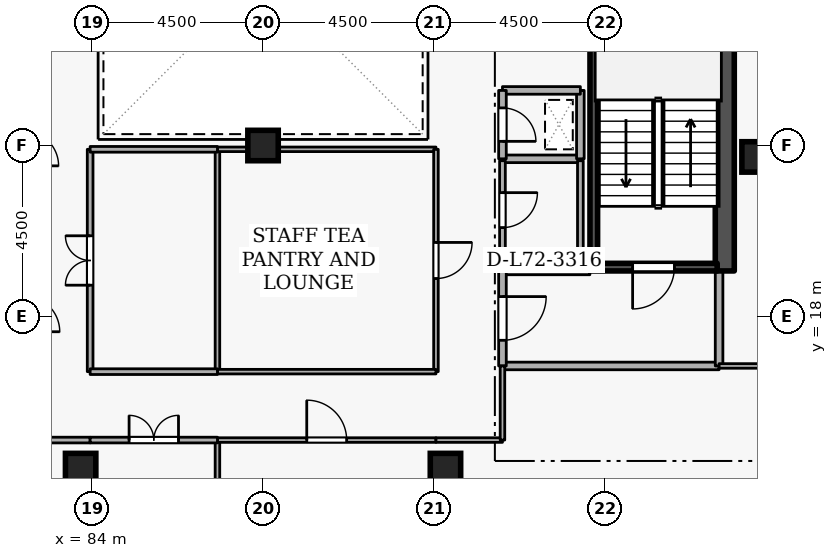
"""IFC4 building model, lengths in metres.
Left out: names, types, materials, properties, quantities, classifications, styles, units other than length and angle.
Written with IfcOpenShell. Run it as: python <this file> out.ifc"""

import sys

from ifc_helpers import new_model, si_unit, direction, frame, frame_2d, origin, origin_2d, place, context, subcontext, project, spatial, rectangle, extrude, element, fill, save


model = new_model("IFC4")
c1 = context("Model", 3, precision=1e-05, world=origin(), true_north=direction((0.0, 1.0)))
c2 = subcontext(c1, "Body", "Model", "MODEL_VIEW")
j1 = project(units=[si_unit("LENGTHUNIT", "METRE"), si_unit("PLANEANGLEUNIT", "RADIAN")], contexts=[c1])
p1 = place(None, origin())
s1 = spatial("IfcSite", under=j1, at=p1, CompositionType="ELEMENT")
p2 = place(p1, origin())
s2 = spatial("IfcBuilding", under=s1, at=p2, CompositionType="ELEMENT")
p3 = place(p2, frame((0.0, 0.0, 269.1)))
s3 = spatial("IfcBuildingStorey", under=s2, at=p3, CompositionType="ELEMENT", Elevation=269.1)
p4 = place(p3, frame((100.65, 19.2, 0.0), z_axis=(0.0, 0.0, 1.0), x_axis=(0.0, 1.0, 0.0)))
e1 = element("IfcWall", 1, at=p4, inside=s3, PredefinedType="SHEAR", context=c2, shape_type="SweptSolid", body=[
    extrude(rectangle(XDim=15.6, YDim=0.5, at=frame_2d((7.8, 0.0))), origin(), (0.0, 0.0, 1.0), 3.6),
])
for number, where, z_axis, x_axis in (
    (2, (93.3, 14.0, 0.0), (0.0, 0.0, 1.0), (1.0, 0.0, 0.0)),
    (3, (83.7, 14.0, 0.0), (0.0, 0.0, 1.0), (1.0, 0.0, 0.0)),
    (4, (101.5, 22.2, 0.0), (0.0, 0.0, 1.0), (1.0, 0.0, 0.0)),
    (5, (88.5, 22.5, 0.0), (0.0, 0.0, 1.0), (1.0, 0.0, 0.0)),
):
    element("IfcColumn", number, at=place(p3, frame(where, z_axis=z_axis, x_axis=x_axis)), inside=s3, PredefinedType="COLUMN", context=c2, shape_type="SweptSolid", body=[
        extrude(rectangle(XDim=0.8, YDim=0.8, at=origin_2d()), origin(), (0.0, 0.0, 1.0), 3.6),
    ])
p5 = place(p3, frame((100.45, 19.3, 0.0), z_axis=(0.0, 0.0, 1.0), x_axis=(-1.0, 0.0, 0.0)))
e6 = element("IfcWall", 6, at=p5, inside=s3, PredefinedType="SHEAR", context=c2, shape_type="SweptSolid", body=[
    extrude(rectangle(XDim=3.35, YDim=0.2, at=frame_2d((1.675, 0.0))), origin(), (0.0, 0.0, 1.0), 3.6),
])
p6 = place(p5, frame((1.125, 0.0, 0.0)))
e7 = element("IfcOpeningElement", 7, at=p6, cuts=e6, PredefinedType="OPENING", context=c2, shape_type="SweptSolid", body=[
    extrude(rectangle(XDim=1.1, YDim=2.1, at=frame_2d((0.55, 1.05))), frame((0.0, 0.11, 0.0), z_axis=(0.0, -1.0, 0.0), x_axis=(1.0, 0.0, 0.0)), (0.0, 0.0, 1.0), 0.22),
])
p7 = place(p3, frame((97.203, 26.55, 0.0), z_axis=(0.0, 0.0, 1.0), x_axis=(0.0, -1.0, 0.0)))
e8 = element("IfcWall", 8, at=p7, inside=s3, PredefinedType="SHEAR", context=c2, shape_type="SweptSolid", body=[
    extrude(rectangle(XDim=7.1, YDim=0.2, at=frame_2d((3.55, 0.0))), origin(), (0.0, 0.0, 1.0), 3.6),
])
p8 = place(p3, frame((94.8, 16.7, 0.0), z_axis=(0.0, 0.0, 1.0), x_axis=(1.0, 0.0, 0.0)))
e9 = element("IfcWall", 9, at=p8, inside=s3, PredefinedType="STANDARD", context=c2, shape_type="SweptSolid", body=[
    extrude(rectangle(XDim=5.7, YDim=0.2, at=frame_2d((2.85, 0.0))), origin(), (0.0, 0.0, 1.0), 3.34),
])
p9 = place(p3, frame((100.5, 16.7, 0.0), z_axis=(0.0, 0.0, 1.0), x_axis=(0.0, 1.0, 0.0)))
e10 = element("IfcWall", 10, at=p9, inside=s3, PredefinedType="STANDARD", context=c2, shape_type="SweptSolid", body=[
    extrude(rectangle(XDim=2.5, YDim=0.2, at=frame_2d((1.25, 0.0))), origin(), (0.0, 0.0, 1.0), 3.34),
])
p10 = place(p3, frame((97.1, 19.2, 0.0), z_axis=(0.0, 0.0, 1.0), x_axis=(-1.0, 0.0, 0.0)))
e11 = element("IfcWall", 11, at=p10, inside=s3, PredefinedType="STANDARD", context=c2, shape_type="SweptSolid", body=[
    extrude(rectangle(XDim=2.3, YDim=0.2, at=frame_2d((1.15, 0.0))), origin(), (0.0, 0.0, 1.0), 2.545),
])
p11 = place(p3, frame((94.8, 19.2, 0.0), z_axis=(0.0, 0.0, 1.0), x_axis=(0.0, -1.0, 0.0)))
e12 = element("IfcWall", 12, at=p11, inside=s3, PredefinedType="STANDARD", context=c2, shape_type="SweptSolid", body=[
    extrude(rectangle(XDim=2.5, YDim=0.2, at=frame_2d((1.25, 0.0))), origin(), (0.0, 0.0, 1.0), 3.34),
])
p12 = place(p11, frame((0.675, 0.0, 0.0)))
e13 = element("IfcOpeningElement", 13, at=p12, cuts=e12, PredefinedType="OPENING", context=c2, shape_type="SweptSolid", body=[
    extrude(rectangle(XDim=1.15, YDim=2.1, at=frame_2d((0.575, 1.05))), frame((0.0, 0.11, 0.0), z_axis=(0.0, -1.0, 0.0), x_axis=(1.0, 0.0, 0.0)), (0.0, 0.0, 1.0), 0.22),
])
p13 = place(p3, frame((94.8, 22.15, 0.0), z_axis=(0.0, 0.0, 1.0), x_axis=(1.0, 0.0, 0.0)))
e14 = element("IfcWall", 14, at=p13, inside=s3, PredefinedType="STANDARD", context=c2, shape_type="SweptSolid", body=[
    extrude(rectangle(XDim=2.05, YDim=0.2, at=frame_2d((1.025, 0.0))), origin(), (0.0, 0.0, 1.0), 3.34),
])
p14 = place(p3, frame((96.85, 22.15, 0.0), z_axis=(0.0, 0.0, 1.0), x_axis=(0.0, 1.0, 0.0)))
e15 = element("IfcWall", 15, at=p14, inside=s3, PredefinedType="STANDARD", context=c2, shape_type="SweptSolid", body=[
    extrude(rectangle(XDim=1.8, YDim=0.2, at=frame_2d((0.9, 0.0))), origin(), (0.0, 0.0, 1.0), 3.34),
])
p15 = place(p3, frame((96.85, 23.95, 0.0), z_axis=(0.0, 0.0, 1.0), x_axis=(-1.0, 0.0, 0.0)))
e16 = element("IfcWall", 16, at=p15, inside=s3, PredefinedType="STANDARD", context=c2, shape_type="SweptSolid", body=[
    extrude(rectangle(XDim=2.05, YDim=0.2, at=frame_2d((1.025, 0.0))), origin(), (0.0, 0.0, 1.0), 3.34),
])
p16 = place(p3, frame((94.8, 23.95, 0.0), z_axis=(0.0, 0.0, 1.0), x_axis=(0.0, -1.0, 0.0)))
e17 = element("IfcWall", 17, at=p16, inside=s3, PredefinedType="STANDARD", context=c2, shape_type="SweptSolid", body=[
    extrude(rectangle(XDim=1.8, YDim=0.2, at=frame_2d((0.9, 0.0))), origin(), (0.0, 0.0, 1.0), 3.34),
])
p17 = place(p16, frame((0.46, 0.0, 0.0)))
e18 = element("IfcOpeningElement", 18, at=p17, cuts=e17, PredefinedType="OPENING", context=c2, shape_type="SweptSolid", body=[
    extrude(rectangle(XDim=0.88, YDim=2.04, at=frame_2d((0.44, 1.02))), frame((0.0, 0.11, 0.0), z_axis=(0.0, -1.0, 0.0), x_axis=(1.0, 0.0, 0.0)), (0.0, 0.0, 1.0), 0.22),
])
p18 = place(p3, frame((94.8, 19.5, 0.0), z_axis=(0.0, 0.0, 1.0), x_axis=(1.0, 0.0, 0.0)))
e19 = element("IfcWall", 19, at=p18, inside=s3, PredefinedType="PARTITIONING", context=c2, shape_type="SweptSolid", body=[
    extrude(rectangle(XDim=2.05, YDim=0.15, at=frame_2d((1.025, 0.0))), origin(), (0.0, 0.0, 1.0), 2.545),
])
p19 = place(p3, frame((96.85, 19.5, 0.0), z_axis=(0.0, 0.0, 1.0), x_axis=(0.0, 1.0, 0.0)))
e20 = element("IfcWall", 20, at=p19, inside=s3, PredefinedType="PARTITIONING", context=c2, shape_type="SweptSolid", body=[
    extrude(rectangle(XDim=2.6, YDim=0.15, at=frame_2d((1.3, 0.0))), origin(), (0.0, 0.0, 1.0), 3.34),
])
p20 = place(p3, frame((94.8, 22.1, 0.0), z_axis=(0.0, 0.0, 1.0), x_axis=(0.0, -1.0, 0.0)))
e21 = element("IfcWall", 21, at=p20, inside=s3, PredefinedType="PARTITIONING", context=c2, shape_type="SweptSolid", body=[
    extrude(rectangle(XDim=2.6, YDim=0.15, at=frame_2d((1.3, 0.0))), origin(), (0.0, 0.0, 1.0), 3.34),
])
p21 = place(p20, frame((0.84, 0.0, 0.0)))
e22 = element("IfcOpeningElement", 22, at=p21, cuts=e21, PredefinedType="OPENING", context=c2, shape_type="SweptSolid", body=[
    extrude(rectangle(XDim=0.92, YDim=2.08, at=frame_2d((0.46, 1.04))), frame((0.0, 0.085, 0.0), z_axis=(0.0, -1.0, 0.0), x_axis=(1.0, 0.0, 0.0)), (0.0, 0.0, 1.0), 0.17),
])
p22 = place(p3, frame((87.3, 9.28, 0.0), z_axis=(0.0, 0.0, 1.0), x_axis=(0.0, 1.0, 0.0)))
e23 = element("IfcWall", 23, at=p22, inside=s3, PredefinedType="PARTITIONING", context=c2, shape_type="SweptSolid", body=[
    extrude(rectangle(XDim=5.47, YDim=0.12, at=frame_2d((2.735, 0.0))), origin(), (0.0, 0.0, 1.0), 3.34),
])
p23 = place(p3, frame((87.3, 14.75, 0.0), z_axis=(0.0, 0.0, 1.0), x_axis=(1.0, 0.0, 0.0)))
e24 = element("IfcWall", 24, at=p23, inside=s3, PredefinedType="PARTITIONING", context=c2, shape_type="SweptSolid", body=[
    extrude(rectangle(XDim=5.75, YDim=0.12, at=frame_2d((2.875, 0.0))), origin(), (0.0, 0.0, 1.0), 3.34),
])
p24 = place(p23, frame((2.35, 0.0, 0.0)))
e25 = element("IfcOpeningElement", 25, at=p24, cuts=e24, PredefinedType="OPENING", context=c2, shape_type="SweptSolid", body=[
    extrude(rectangle(XDim=1.05, YDim=2.1, at=frame_2d((0.525, 1.05))), frame((0.0, 0.07, 0.0), z_axis=(0.0, -1.0, 0.0), x_axis=(1.0, 0.0, 0.0)), (0.0, 0.0, 1.0), 0.14),
])
p25 = place(p3, frame((93.05, 14.75, 0.0), z_axis=(0.0, 0.0, 1.0), x_axis=(1.0, 0.0, 0.0)))
e26 = element("IfcWall", 26, at=p25, inside=s3, PredefinedType="PARTITIONING", context=c2, shape_type="SweptSolid", body=[
    extrude(rectangle(XDim=1.75, YDim=0.12, at=frame_2d((0.875, 0.0))), origin(), (0.0, 0.0, 1.0), 3.34),
])
p26 = place(p3, frame((94.8, 14.75, 0.0), z_axis=(0.0, 0.0, 1.0), x_axis=(0.0, 1.0, 0.0)))
e27 = element("IfcWall", 27, at=p26, inside=s3, PredefinedType="PARTITIONING", context=c2, shape_type="SweptSolid", body=[
    extrude(rectangle(XDim=1.95, YDim=0.12, at=frame_2d((0.975, 0.0))), origin(), (0.0, 0.0, 1.0), 3.34),
])
p27 = place(p3, frame((100.5, 16.7, 0.0), z_axis=(0.0, 0.0, 1.0), x_axis=(1.0, 0.0, 0.0)))
e28 = element("IfcWall", 28, at=p27, inside=s3, PredefinedType="PARTITIONING", context=c2, shape_type="SweptSolid", body=[
    extrude(rectangle(XDim=11.72, YDim=0.12, at=frame_2d((5.86, 0.0))), origin(), (0.0, 0.0, 1.0), 3.34),
])
p28 = place(p3, frame((82.2, 14.75, 0.0), z_axis=(0.0, 0.0, 1.0), x_axis=(1.0, 0.0, 0.0)))
e29 = element("IfcWall", 29, at=p28, inside=s3, PredefinedType="PARTITIONING", context=c2, shape_type="SweptSolid", body=[
    extrude(rectangle(XDim=1.75, YDim=0.15, at=frame_2d((0.875, 0.0))), origin(), (0.0, 0.0, 1.0), 3.34),
])
p29 = place(p3, frame((83.95, 14.75, 0.0), z_axis=(0.0, 0.0, 1.0), x_axis=(1.0, 0.0, 0.0)))
e30 = element("IfcWall", 30, at=p29, inside=s3, PredefinedType="PARTITIONING", context=c2, shape_type="SweptSolid", body=[
    extrude(rectangle(XDim=3.35, YDim=0.15, at=frame_2d((1.675, 0.0))), origin(), (0.0, 0.0, 1.0), 3.34),
])
p30 = place(p29, frame((1.025, 0.0, 0.0)))
e31 = element("IfcOpeningElement", 31, at=p30, cuts=e30, PredefinedType="OPENING", context=c2, shape_type="SweptSolid", body=[
    extrude(rectangle(XDim=1.3, YDim=2.12, at=frame_2d((0.65, 1.06))), frame((0.0, 0.085, 0.0), z_axis=(0.0, -1.0, 0.0), x_axis=(1.0, 0.0, 0.0)), (0.0, 0.0, 1.0), 0.17),
])
p31 = place(p3, frame((87.3, 16.55, 0.0), z_axis=(0.0, 0.0, 1.0), x_axis=(0.0, 1.0, 0.0)))
e32 = element("IfcWall", 32, at=p31, inside=s3, PredefinedType="PARTITIONING", context=c2, shape_type="SweptSolid", body=[
    extrude(rectangle(XDim=5.85, YDim=0.12, at=frame_2d((2.925, 0.0))), origin(), (0.0, 0.0, 1.0), 3.34),
])
p32 = place(p3, frame((87.3, 22.4, 0.0), z_axis=(0.0, 0.0, 1.0), x_axis=(1.0, 0.0, 0.0)))
e33 = element("IfcWall", 33, at=p32, inside=s3, PredefinedType="PARTITIONING", context=c2, shape_type="SweptSolid", body=[
    extrude(rectangle(XDim=5.75, YDim=0.12, at=frame_2d((2.875, 0.0))), origin(), (0.0, 0.0, 1.0), 3.34),
])
p33 = place(p3, frame((93.05, 22.4, 0.0), z_axis=(0.0, 0.0, 1.0), x_axis=(0.0, -1.0, 0.0)))
e34 = element("IfcWall", 34, at=p33, inside=s3, PredefinedType="PARTITIONING", context=c2, shape_type="SweptSolid", body=[
    extrude(rectangle(XDim=5.85, YDim=0.12, at=frame_2d((2.925, 0.0))), origin(), (0.0, 0.0, 1.0), 3.34),
])
p34 = place(p33, frame((2.45, 0.0, 0.0)))
e35 = element("IfcOpeningElement", 35, at=p34, cuts=e34, PredefinedType="OPENING", context=c2, shape_type="SweptSolid", body=[
    extrude(rectangle(XDim=0.95, YDim=2.1, at=frame_2d((0.475, 1.05))), frame((0.0, 0.07, 0.0), z_axis=(0.0, -1.0, 0.0), x_axis=(1.0, 0.0, 0.0)), (0.0, 0.0, 1.0), 0.14),
])
p35 = place(p3, frame((93.05, 16.55, 0.0), z_axis=(0.0, 0.0, 1.0), x_axis=(-1.0, 0.0, 0.0)))
e36 = element("IfcWall", 36, at=p35, inside=s3, PredefinedType="PARTITIONING", context=c2, shape_type="SweptSolid", body=[
    extrude(rectangle(XDim=5.75, YDim=0.12, at=frame_2d((2.875, 0.0))), origin(), (0.0, 0.0, 1.0), 3.34),
])
p36 = place(p3, frame((83.95, 16.55, 0.0), z_axis=(0.0, 0.0, 1.0), x_axis=(0.0, 1.0, 0.0)))
e37 = element("IfcWall", 37, at=p36, inside=s3, PredefinedType="PARTITIONING", context=c2, shape_type="SweptSolid", body=[
    extrude(rectangle(XDim=5.85, YDim=0.15, at=frame_2d((2.925, 0.0))), origin(), (0.0, 0.0, 1.0), 3.34),
])
p37 = place(p36, frame((2.275, 0.0, 0.0)))
e38 = element("IfcOpeningElement", 38, at=p37, cuts=e37, PredefinedType="OPENING", context=c2, shape_type="SweptSolid", body=[
    extrude(rectangle(XDim=1.3, YDim=2.12, at=frame_2d((0.65, 1.06))), frame((0.0, 0.085, 0.0), z_axis=(0.0, -1.0, 0.0), x_axis=(1.0, 0.0, 0.0)), (0.0, 0.0, 1.0), 0.17),
])
for number, where, z_axis, x_axis in (
    (39, (83.95, 22.4, 0.0), (0.0, 0.0, 1.0), (1.0, 0.0, 0.0)),
    (40, (87.3, 16.55, 0.0), (0.0, 0.0, 1.0), (-1.0, 0.0, 0.0)),
):
    element("IfcWall", number, at=place(p3, frame(where, z_axis=z_axis, x_axis=x_axis)), inside=s3, PredefinedType="PARTITIONING", context=c2, shape_type="SweptSolid", body=[
        extrude(rectangle(XDim=3.35, YDim=0.15, at=frame_2d((1.675, 0.0))), origin(), (0.0, 0.0, 1.0), 3.34),
    ])
p38 = place(p6, origin())
e41 = element("IfcDoor", 41, at=p38, inside=s3, OperationType="SINGLE_SWING_RIGHT", PredefinedType="DOOR", context=c2, shape_type="SweptSolid", body=[
    extrude(rectangle(XDim=1.1, YDim=2.1, at=frame_2d((0.55, 1.05))), frame((0.0, 0.025, 0.0), z_axis=(0.0, -1.0, 0.0), x_axis=(1.0, 0.0, 0.0)), (0.0, 0.0, 1.0), 0.05),
])
fill(e7, e41)
p39 = place(p12, origin())
e42 = element("IfcDoor", 42, at=p39, inside=s3, OperationType="SINGLE_SWING_LEFT", PredefinedType="DOOR", context=c2, shape_type="SweptSolid", body=[
    extrude(rectangle(XDim=1.15, YDim=2.1, at=frame_2d((0.575, 1.05))), frame((0.0, 0.025, 0.0), z_axis=(0.0, -1.0, 0.0), x_axis=(1.0, 0.0, 0.0)), (0.0, 0.0, 1.0), 0.05),
])
fill(e13, e42)
p40 = place(p17, origin())
e43 = element("IfcDoor", 43, at=p40, inside=s3, OperationType="SINGLE_SWING_RIGHT", PredefinedType="DOOR", context=c2, shape_type="SweptSolid", body=[
    extrude(rectangle(XDim=0.88, YDim=2.04, at=frame_2d((0.44, 1.02))), frame((0.0, 0.025, 0.0), z_axis=(0.0, -1.0, 0.0), x_axis=(1.0, 0.0, 0.0)), (0.0, 0.0, 1.0), 0.05),
])
fill(e18, e43)
p41 = place(p21, origin())
e44 = element("IfcDoor", 44, at=p41, inside=s3, OperationType="SINGLE_SWING_LEFT", PredefinedType="DOOR", context=c2, shape_type="SweptSolid", body=[
    extrude(rectangle(XDim=0.92, YDim=2.08, at=frame_2d((0.46, 1.04))), frame((0.0, 0.025, 0.0), z_axis=(0.0, -1.0, 0.0), x_axis=(1.0, 0.0, 0.0)), (0.0, 0.0, 1.0), 0.05),
])
fill(e22, e44)
p42 = place(p24, origin())
e45 = element("IfcDoor", 45, at=p42, inside=s3, OperationType="SINGLE_SWING_LEFT", PredefinedType="DOOR", context=c2, shape_type="SweptSolid", body=[
    extrude(rectangle(XDim=1.05, YDim=2.1, at=frame_2d((0.525, 1.05))), frame((0.0, 0.025, 0.0), z_axis=(0.0, -1.0, 0.0), x_axis=(1.0, 0.0, 0.0)), (0.0, 0.0, 1.0), 0.05),
])
fill(e25, e45)
p43 = place(p30, origin())
e46 = element("IfcDoor", 46, at=p43, inside=s3, OperationType="DOUBLE_DOOR_SINGLE_SWING", PredefinedType="DOOR", context=c2, shape_type="SweptSolid", body=[
    extrude(rectangle(XDim=1.3, YDim=2.12, at=frame_2d((0.65, 1.06))), frame((0.0, 0.025, 0.0), z_axis=(0.0, -1.0, 0.0), x_axis=(1.0, 0.0, 0.0)), (0.0, 0.0, 1.0), 0.05),
])
fill(e31, e46)
p44 = place(p34, origin())
e47 = element("IfcDoor", 47, at=p44, inside=s3, OperationType="SINGLE_SWING_LEFT", PredefinedType="DOOR", context=c2, shape_type="SweptSolid", body=[
    extrude(rectangle(XDim=0.95, YDim=2.1, at=frame_2d((0.475, 1.05))), frame((0.0, 0.025, 0.0), z_axis=(0.0, -1.0, 0.0), x_axis=(1.0, 0.0, 0.0)), (0.0, 0.0, 1.0), 0.05),
])
fill(e35, e47)
p45 = place(p37, origin())
e48 = element("IfcDoor", 48, at=p45, inside=s3, OperationType="DOUBLE_DOOR_SINGLE_SWING", PredefinedType="DOOR", context=c2, shape_type="SweptSolid", body=[
    extrude(rectangle(XDim=1.3, YDim=2.12, at=frame_2d((0.65, 1.06))), frame((0.0, 0.025, 0.0), z_axis=(0.0, -1.0, 0.0), x_axis=(1.0, 0.0, 0.0)), (0.0, 0.0, 1.0), 0.05),
])
fill(e38, e48)
save(model, sys.argv[1])
